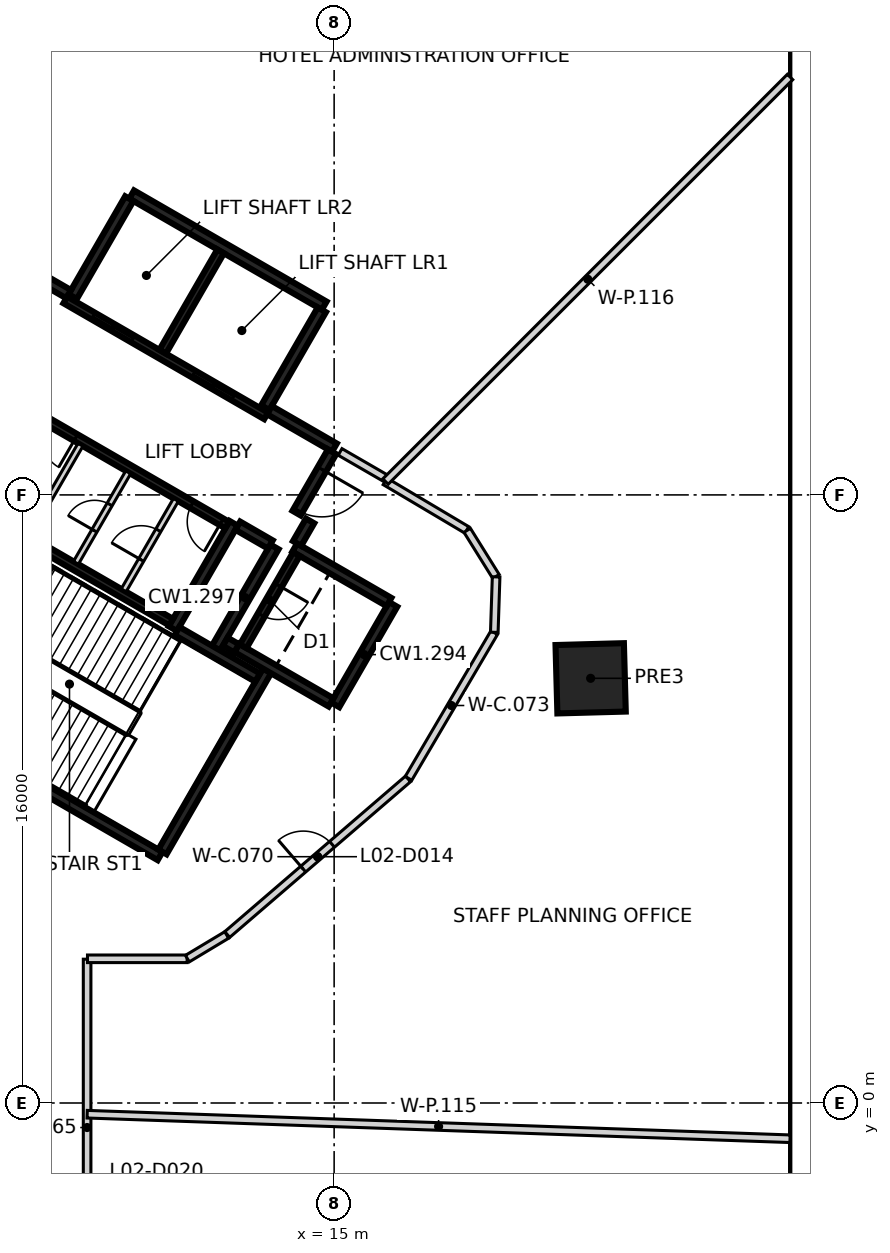
"""IFC4 building model, lengths in metres.
Left out: names, types, materials, properties, quantities, classifications, styles, units other than length and angle.
Written with IfcOpenShell. Run it as: python <this file> out.ifc"""

import sys

from ifc_helpers import new_model, si_unit, direction, frame, frame_2d, origin, origin_2d, place, context, subcontext, project, spatial, rectangle, extrude, element, fill, save


model = new_model("IFC4")
c1 = context("Model", 3, precision=1e-05, world=origin(), true_north=direction((0.0, 1.0)))
c2 = subcontext(c1, "Body", "Model", "MODEL_VIEW")
j1 = project(units=[si_unit("LENGTHUNIT", "METRE"), si_unit("PLANEANGLEUNIT", "RADIAN")], contexts=[c1])
p1 = place(None, origin())
s1 = spatial("IfcSite", under=j1, at=p1, CompositionType="ELEMENT")
p2 = place(p1, origin())
s2 = spatial("IfcBuilding", under=s1, at=p2, CompositionType="ELEMENT")
p3 = place(p2, frame((0.0, 0.0, 14.0)))
s3 = spatial("IfcBuildingStorey", under=s2, at=p3, CompositionType="ELEMENT", Elevation=14.0)
p4 = place(p3, frame((21.749, 11.174, -0.35), z_axis=(0.0, 0.0, 1.0), x_axis=(0.999628128016, 0.02726913418, 0.0)))
e1 = element("IfcColumn", 1, at=p4, inside=s3, PredefinedType="COLUMN", context=c2, shape_type="SweptSolid", body=[
    extrude(rectangle(XDim=1.8, YDim=1.8, at=origin_2d()), origin(), (0.0, 0.0, 1.0), 3.1),
])
p5 = place(p3, frame((10.42, 6.498, 0.0), z_axis=(0.0, 0.0, 1.0), x_axis=(-0.866021906294, 0.500006057782, 0.0)))
e2 = element("IfcWall", 2, at=p5, inside=s3, PredefinedType="SHEAR", context=c2, shape_type="SweptSolid", body=[
    extrude(rectangle(XDim=11.55, YDim=0.25, at=frame_2d((5.775, 0.0))), origin(), (0.0, 0.0, 1.0), 5.15),
])
p6 = place(p5, frame((10.025, 0.0, 0.0)))
e3 = element("IfcOpeningElement", 3, at=p6, cuts=e2, PredefinedType="OPENING", context=c2, shape_type="SweptSolid", body=[
    extrude(rectangle(XDim=1.2, YDim=2.1, at=frame_2d((0.6, 1.05))), frame((0.0, 0.135, 0.0), z_axis=(0.0, -1.0, 0.0), x_axis=(1.0, 0.0, 0.0)), (0.0, 0.0, 1.0), 0.27),
])
p7 = place(p5, frame((8.725, 0.0, 0.0)))
e4 = element("IfcOpeningElement", 4, at=p7, cuts=e2, PredefinedType="OPENING", context=c2, shape_type="SweptSolid", body=[
    extrude(rectangle(XDim=1.2, YDim=2.1, at=frame_2d((0.6, 1.05))), frame((0.0, 0.135, 0.0), z_axis=(0.0, -1.0, 0.0), x_axis=(1.0, 0.0, 0.0)), (0.0, 0.0, 1.0), 0.27),
])
p8 = place(p3, frame((9.673, 23.903, 0.0), z_axis=(0.0, 0.0, 1.0), x_axis=(0.86603616409, -0.499981362141, 0.0)))
e5 = element("IfcWall", 5, at=p8, inside=s3, PredefinedType="SHEAR", context=c2, shape_type="SweptSolid", body=[
    extrude(rectangle(XDim=5.85, YDim=0.25, at=frame_2d((2.925, 0.0))), origin(), (0.0, 0.0, 1.0), 5.15),
])
p9 = place(p3, frame((13.238, 11.378, 0.0), z_axis=(0.0, 0.0, 1.0), x_axis=(-0.500008851346, -0.866020293397, 0.0)))
e6 = element("IfcWall", 6, at=p9, inside=s3, PredefinedType="SHEAR", context=c2, shape_type="SweptSolid", body=[
    extrude(rectangle(XDim=5.51, YDim=0.25, at=frame_2d((2.755, 0.0))), origin(), (0.0, 0.0, 1.0), 5.15),
])
p10 = place(p3, frame((12.357, 15.252, 0.0), z_axis=(0.0, 0.0, 1.0), x_axis=(-0.500028443584, -0.866008981251, 0.0)))
e7 = element("IfcWall", 7, at=p10, inside=s3, PredefinedType="SHEAR", context=c2, shape_type="SweptSolid", body=[
    extrude(rectangle(XDim=3.2, YDim=0.25, at=frame_2d((1.6, 0.0))), origin(), (0.0, 0.0, 1.0), 5.15),
])
for number, where, z_axis, x_axis in (
    (8, (8.123, 21.219, 0.0), (0.0, 0.0, 1.0), (0.5, 0.866, 0.0)),
    (9, (14.676, 20.87, 0.0), (0.0, 0.0, 1.0), (-0.5, -0.866, 0.0)),
):
    element("IfcWall", number, at=place(p3, frame(where, z_axis=z_axis, x_axis=x_axis)), inside=s3, PredefinedType="SHEAR", context=c2, shape_type="SweptSolid", body=[
        extrude(rectangle(XDim=2.975, YDim=0.25, at=frame_2d((1.487, 0.0))), origin(), (0.0, 0.0, 1.0), 5.15),
    ])
p11 = place(p3, frame((16.552, 13.119, 0.0), z_axis=(0.0, 0.0, 1.0), x_axis=(-0.499978833458, -0.866037623948, 0.0)))
e10 = element("IfcWall", 10, at=p11, inside=s3, PredefinedType="SHEAR", context=c2, shape_type="SweptSolid", body=[
    extrude(rectangle(XDim=3.05, YDim=0.25, at=frame_2d((1.525, 0.0))), origin(), (0.0, 0.0, 1.0), 5.15),
])
p12 = place(p3, frame((14.918, 10.54, 0.0), z_axis=(0.0, 0.0, 1.0), x_axis=(-0.866063538972, 0.499933942099, 0.0)))
e11 = element("IfcWall", 11, at=p12, inside=s3, PredefinedType="SHEAR", context=c2, shape_type="SweptSolid", body=[
    extrude(rectangle(XDim=2.865, YDim=0.25, at=frame_2d((1.432, 0.0))), origin(), (0.0, 0.0, 1.0), 5.15),
])
p13 = place(p3, frame((13.963, 14.614, 0.0), z_axis=(0.0, 0.0, 1.0), x_axis=(0.866042235819, -0.499970844928, 0.0)))
e12 = element("IfcWall", 12, at=p13, inside=s3, PredefinedType="SHEAR", context=c2, shape_type="SweptSolid", body=[
    extrude(rectangle(XDim=2.865, YDim=0.25, at=frame_2d((1.432, 0.0))), origin(), (0.0, 0.0, 1.0), 5.15),
])
p14 = place(p3, frame((11.888, 11.961, 0.0), z_axis=(0.0, 0.0, 1.0), x_axis=(0.500003324108, 0.866023484601, 0.0)))
e13 = element("IfcWall", 13, at=p14, inside=s3, PredefinedType="SHEAR", context=c2, shape_type="SweptSolid", body=[
    extrude(rectangle(XDim=3.085, YDim=0.25, at=frame_2d((1.542, 0.0))), origin(), (0.0, 0.0, 1.0), 5.15),
])
p15 = place(p3, frame((10.865, 12.418, 0.0), z_axis=(0.0, 0.0, 1.0), x_axis=(0.866026229868, -0.499998569178, 0.0)))
e14 = element("IfcWall", 14, at=p15, inside=s3, PredefinedType="SHEAR", context=c2, shape_type="SweptSolid", body=[
    extrude(rectangle(XDim=2.449, YDim=0.25, at=frame_2d((1.225, 0.0))), origin(), (0.0, 0.0, 1.0), 5.15),
])
p16 = place(p3, frame((13.297, 18.231, 0.0), z_axis=(0.0, 0.0, 1.0), x_axis=(0.866043531843, -0.499968599967, 0.0)))
e15 = element("IfcWall", 15, at=p16, inside=s3, PredefinedType="SHEAR", context=c2, shape_type="SweptSolid", body=[
    extrude(rectangle(XDim=1.975, YDim=0.25, at=frame_2d((0.987, 0.0))), origin(), (0.0, 0.0, 1.0), 5.15),
])
p17 = place(p3, frame((6.413, 22.206, 0.0), z_axis=(0.0, 0.0, 1.0), x_axis=(0.866016279763, -0.500015802937, 0.0)))
e16 = element("IfcWall", 16, at=p17, inside=s3, PredefinedType="SHEAR", context=c2, shape_type="SweptSolid", body=[
    extrude(rectangle(XDim=1.849, YDim=0.25, at=frame_2d((0.925, 0.0))), origin(), (0.0, 0.0, 1.0), 5.15),
])
p18 = place(p3, frame((14.945, 17.135, 0.0), z_axis=(0.0, 0.0, 1.0), x_axis=(-0.499983108224, -0.866035156036, 0.0)))
e17 = element("IfcWall", 17, at=p18, inside=s3, PredefinedType="SHEAR", context=c2, shape_type="SweptSolid", body=[
    extrude(rectangle(XDim=1.865, YDim=0.25, at=frame_2d((0.932, 0.0))), origin(), (0.0, 0.0, 1.0), 5.15),
])
p19 = place(p18, frame((0.535, 0.0, 0.0)))
e18 = element("IfcOpeningElement", 18, at=p19, cuts=e17, PredefinedType="OPENING", context=c2, shape_type="SweptSolid", body=[
    extrude(rectangle(XDim=1.25, YDim=2.1, at=frame_2d((0.625, 1.05))), frame((0.0, 0.135, 0.0), z_axis=(0.0, -1.0, 0.0), x_axis=(1.0, 0.0, 0.0)), (0.0, 0.0, 1.0), 0.27),
])
p20 = place(p3, frame((13.322, 14.695, 0.0), z_axis=(0.0, 0.0, 1.0), x_axis=(-0.866017078145, 0.500014420154, 0.0)))
e19 = element("IfcWall", 19, at=p20, inside=s3, PredefinedType="SHEAR", context=c2, shape_type="SweptSolid", body=[
    extrude(rectangle(XDim=0.989, YDim=0.25, at=frame_2d((0.495, 0.0))), origin(), (0.0, 0.0, 1.0), 5.15),
])
p21 = place(p3, frame((14.368, 15.315, 0.0), z_axis=(0.0, 0.0, 1.0), x_axis=(-0.499897359611, -0.866084655132, 0.0)))
e20 = element("IfcWall", 20, at=p21, inside=s3, PredefinedType="SHEAR", context=c2, shape_type="SweptSolid", body=[
    extrude(rectangle(XDim=0.685, YDim=0.25, at=frame_2d((0.342, 0.0))), origin(), (0.0, 0.0, 1.0), 5.15),
])
p22 = place(p3, frame((12.433, 11.964, 0.0), z_axis=(0.0, 0.0, 1.0), x_axis=(-0.866055875208, 0.499947218231, 0.0)))
e21 = element("IfcWall", 21, at=p22, inside=s3, PredefinedType="SHEAR", context=c2, shape_type="SweptSolid", body=[
    extrude(rectangle(XDim=0.345, YDim=0.25, at=frame_2d((0.172, 0.0))), origin(), (0.0, 0.0, 1.0), 5.15),
])
p23 = place(p3, frame((13.21, 18.08, 0.0), z_axis=(0.0, 0.0, 1.0), x_axis=(-0.866030299012, 0.499991521122, 0.0)))
e22 = element("IfcWall", 22, at=p23, inside=s3, PredefinedType="SHEAR", context=c2, shape_type="SweptSolid", body=[
    extrude(rectangle(XDim=6.1, YDim=0.2, at=frame_2d((3.05, 0.0))), origin(), (0.0, 0.0, 1.0), 5.15),
])
p24 = place(p23, frame((1.0, 0.0, 0.0)))
e23 = element("IfcOpeningElement", 23, at=p24, cuts=e22, PredefinedType="OPENING", context=c2, shape_type="SweptSolid", body=[
    extrude(rectangle(XDim=1.2, YDim=2.1, at=frame_2d((0.6, 1.05))), frame((0.0, 0.11, 0.0), z_axis=(0.0, -1.0, 0.0), x_axis=(1.0, 0.0, 0.0)), (0.0, 0.0, 1.0), 0.22),
])
p25 = place(p23, frame((4.05, 0.0, 0.0)))
e24 = element("IfcOpeningElement", 24, at=p25, cuts=e22, PredefinedType="OPENING", context=c2, shape_type="SweptSolid", body=[
    extrude(rectangle(XDim=1.2, YDim=2.1, at=frame_2d((0.6, 1.05))), frame((0.0, 0.11, 0.0), z_axis=(0.0, -1.0, 0.0), x_axis=(1.0, 0.0, 0.0)), (0.0, 0.0, 1.0), 0.22),
])
p26 = place(p3, frame((5.775, 15.502, 0.0), z_axis=(0.0, 0.0, 1.0), x_axis=(0.866020080793, -0.500009219579, 0.0)))
e25 = element("IfcWall", 25, at=p26, inside=s3, PredefinedType="SHEAR", context=c2, shape_type="SweptSolid", body=[
    extrude(rectangle(XDim=5.699, YDim=0.2, at=frame_2d((2.85, 0.0))), origin(), (0.0, 0.0, 1.0), 5.15),
])
p27 = place(p3, frame((12.185, 15.207, 0.0), z_axis=(0.0, 0.0, 1.0), x_axis=(-0.866020080793, 0.500009219579, 0.0)))
e26 = element("IfcWall", 26, at=p27, inside=s3, PredefinedType="SHEAR", context=c2, shape_type="SweptSolid", body=[
    extrude(rectangle(XDim=5.699, YDim=0.2, at=frame_2d((2.85, 0.0))), origin(), (0.0, 0.0, 1.0), 5.15),
])
p28 = place(p27, frame((0.174, 0.0, 0.0)))
e27 = element("IfcOpeningElement", 27, at=p28, cuts=e26, PredefinedType="OPENING", context=c2, shape_type="SweptSolid", body=[
    extrude(rectangle(XDim=0.9, YDim=2.1, at=frame_2d((0.45, 1.05))), frame((0.0, 0.11, 0.0), z_axis=(0.0, -1.0, 0.0), x_axis=(1.0, 0.0, 0.0)), (0.0, 0.0, 1.0), 0.22),
])
p29 = place(p27, frame((4.599, 0.0, 0.0)))
e28 = element("IfcOpeningElement", 28, at=p29, cuts=e26, PredefinedType="OPENING", context=c2, shape_type="SweptSolid", body=[
    extrude(rectangle(XDim=0.9, YDim=2.1, at=frame_2d((0.45, 1.05))), frame((0.0, 0.11, 0.0), z_axis=(0.0, -1.0, 0.0), x_axis=(1.0, 0.0, 0.0)), (0.0, 0.0, 1.0), 0.22),
])
p30 = place(p3, frame((10.489, 19.767, 0.0), z_axis=(0.0, 0.0, 1.0), x_axis=(0.499946628782, 0.866056215479, 0.0)))
e29 = element("IfcWall", 29, at=p30, inside=s3, PredefinedType="SHEAR", context=c2, shape_type="SweptSolid", body=[
    extrude(rectangle(XDim=3.048, YDim=0.2, at=frame_2d((1.524, 0.0))), origin(), (0.0, 0.0, 1.0), 5.15),
])
p31 = place(p3, frame((14.008, 14.442, 0.0), z_axis=(0.0, 0.0, 1.0), x_axis=(-0.499986818241, -0.866033014143, 0.0)))
e30 = element("IfcWall", 30, at=p31, inside=s3, PredefinedType="SHEAR", context=c2, shape_type="SweptSolid", body=[
    extrude(rectangle(XDim=2.798, YDim=0.2, at=frame_2d((1.399, 0.0))), origin(), (0.0, 0.0, 1.0), 5.15),
])
p32 = place(p31, frame((0.949, 0.0, 0.0)))
e31 = element("IfcOpeningElement", 31, at=p32, cuts=e30, PredefinedType="OPENING", context=c2, shape_type="SweptSolid", body=[
    extrude(rectangle(XDim=0.9, YDim=2.1, at=frame_2d((0.45, 1.05))), frame((0.0, 0.11, 0.0), z_axis=(0.0, -1.0, 0.0), x_axis=(1.0, 0.0, 0.0)), (0.0, 0.0, 1.0), 0.22),
])
p33 = place(p3, frame((9.462, 13.489, 0.0), z_axis=(0.0, 0.0, 1.0), x_axis=(0.50002746344, 0.86600954718, 0.0)))
e32 = element("IfcWall", 32, at=p33, inside=s3, PredefinedType="PARTITIONING", context=c2, shape_type="SweptSolid", body=[
    extrude(rectangle(XDim=2.748, YDim=0.15, at=frame_2d((1.374, 0.0))), origin(), (0.0, 0.0, 1.0), 5.15),
])
p34 = place(p33, frame((0.924, 0.0, 0.0)))
e33 = element("IfcOpeningElement", 33, at=p34, cuts=e32, PredefinedType="OPENING", context=c2, shape_type="SweptSolid", body=[
    extrude(rectangle(XDim=0.9, YDim=2.1, at=frame_2d((0.45, 1.05))), frame((0.0, 0.085, 0.0), z_axis=(0.0, -1.0, 0.0), x_axis=(1.0, 0.0, 0.0)), (0.0, 0.0, 1.0), 0.17),
])
p35 = place(p3, frame((8.207, 14.214, 0.0), z_axis=(0.0, 0.0, 1.0), x_axis=(0.499922376475, 0.866070215109, 0.0)))
e34 = element("IfcWall", 34, at=p35, inside=s3, PredefinedType="PARTITIONING", context=c2, shape_type="SweptSolid", body=[
    extrude(rectangle(XDim=2.749, YDim=0.15, at=frame_2d((1.374, 0.0))), origin(), (0.0, 0.0, 1.0), 5.15),
])
p36 = place(p35, frame((0.974, 0.0, 0.0)))
e35 = element("IfcOpeningElement", 35, at=p36, cuts=e34, PredefinedType="OPENING", context=c2, shape_type="SweptSolid", body=[
    extrude(rectangle(XDim=0.8, YDim=2.1, at=frame_2d((0.4, 1.05))), frame((0.0, 0.085, 0.0), z_axis=(0.0, -1.0, 0.0), x_axis=(1.0, 0.0, 0.0)), (0.0, 0.0, 1.0), 0.17),
])
p37 = place(p3, frame((6.951, 14.939, 0.0), z_axis=(0.0, 0.0, 1.0), x_axis=(0.50002746344, 0.86600954718, 0.0)))
e36 = element("IfcWall", 36, at=p37, inside=s3, PredefinedType="PARTITIONING", context=c2, shape_type="SweptSolid", body=[
    extrude(rectangle(XDim=2.748, YDim=0.15, at=frame_2d((1.374, 0.0))), origin(), (0.0, 0.0, 1.0), 5.15),
])
p38 = place(p3, frame((8.5, -5.075, 0.0), z_axis=(0.0, 0.0, 1.0), x_axis=(0.0, 1.0, 0.0)))
e37 = element("IfcWall", 37, at=p38, inside=s3, PredefinedType="PARTITIONING", context=c2, shape_type="SweptSolid", body=[
    extrude(rectangle(XDim=8.859, YDim=0.2, at=frame_2d((4.429, 0.0))), origin(), (0.0, 0.0, 1.0), 5.15),
])
p39 = place(p38, frame((1.945, 0.0, 0.0)))
e38 = element("IfcOpeningElement", 38, at=p39, cuts=e37, PredefinedType="OPENING", context=c2, shape_type="SweptSolid", body=[
    extrude(rectangle(XDim=0.9, YDim=2.1, at=frame_2d((0.45, 1.05))), frame((0.0, 0.11, 0.0), z_axis=(0.0, -1.0, 0.0), x_axis=(1.0, 0.0, 0.0)), (0.0, 0.0, 1.0), 0.22),
])
p40 = place(p3, frame((8.51, 3.794, 0.0), z_axis=(0.0, 0.0, 1.0), x_axis=(1.0, 0.0, 0.0)))
e39 = element("IfcWall", 39, at=p40, inside=s3, PredefinedType="PARTITIONING", context=c2, shape_type="SweptSolid", body=[
    extrude(rectangle(XDim=2.622, YDim=0.2, at=frame_2d((1.311, 0.0))), origin(), (0.0, 0.0, 1.0), 5.15),
])
p41 = place(p3, frame((11.138, 3.799, 0.0), z_axis=(0.0, 0.0, 1.0), x_axis=(0.857225224173, 0.514941661785, 0.0)))
e40 = element("IfcWall", 40, at=p41, inside=s3, PredefinedType="PARTITIONING", context=c2, shape_type="SweptSolid", body=[
    extrude(rectangle(XDim=1.208, YDim=0.2, at=frame_2d((0.604, 0.0))), origin(), (0.0, 0.0, 1.0), 5.15),
])
p42 = place(p3, frame((12.187, 4.433, 0.0), z_axis=(0.0, 0.0, 1.0), x_axis=(0.757945584444, 0.652317783769, 0.0)))
e41 = element("IfcWall", 41, at=p42, inside=s3, PredefinedType="PARTITIONING", context=c2, shape_type="SweptSolid", body=[
    extrude(rectangle(XDim=6.278, YDim=0.2, at=frame_2d((3.139, 0.0))), origin(), (0.0, 0.0, 1.0), 5.15),
])
p43 = place(p42, frame((2.639, 0.0, 0.0)))
e42 = element("IfcOpeningElement", 42, at=p43, cuts=e41, PredefinedType="OPENING", context=c2, shape_type="SweptSolid", body=[
    extrude(rectangle(XDim=1.0, YDim=2.1, at=frame_2d((0.5, 1.05))), frame((0.0, 0.11, 0.0), z_axis=(0.0, -1.0, 0.0), x_axis=(1.0, 0.0, 0.0)), (0.0, 0.0, 1.0), 0.22),
])
p44 = place(p3, frame((15.156, 17.131, 0.0), z_axis=(0.0, 0.0, 1.0), x_axis=(0.865567897455, -0.500791588284, 0.0)))
e43 = element("IfcWall", 43, at=p44, inside=s3, PredefinedType="PARTITIONING", context=c2, shape_type="SweptSolid", body=[
    extrude(rectangle(XDim=1.377, YDim=0.2, at=frame_2d((0.688, 0.0))), origin(), (0.0, 0.0, 1.0), 5.15),
])
p45 = place(p3, frame((16.341, 16.356, 0.0), z_axis=(0.0, 0.0, 1.0), x_axis=(0.859680670174, -0.510831817067, 0.0)))
e44 = element("IfcWall", 44, at=p45, inside=s3, PredefinedType="PARTITIONING", context=c2, shape_type="SweptSolid", body=[
    extrude(rectangle(XDim=2.502, YDim=0.2, at=frame_2d((1.251, 0.0))), origin(), (0.0, 0.0, 1.0), 5.15),
])
p46 = place(p3, frame((16.957, 8.542, 0.0), z_axis=(0.0, 0.0, 1.0), x_axis=(0.506952960322, 0.861973721189, 0.0)))
e45 = element("IfcWall", 45, at=p46, inside=s3, PredefinedType="PARTITIONING", context=c2, shape_type="SweptSolid", body=[
    extrude(rectangle(XDim=4.448, YDim=0.2, at=frame_2d((2.224, 0.0))), origin(), (0.0, 0.0, 1.0), 5.15),
])
p47 = place(p3, frame((18.501, 15.068, 0.0), z_axis=(0.0, 0.0, 1.0), x_axis=(0.529124417946, -0.84854425361, 0.0)))
e46 = element("IfcWall", 46, at=p47, inside=s3, PredefinedType="PARTITIONING", context=c2, shape_type="SweptSolid", body=[
    extrude(rectangle(XDim=1.431, YDim=0.2, at=frame_2d((0.715, 0.0))), origin(), (0.0, 0.0, 1.0), 5.15),
])
p48 = place(p3, frame((19.214, 12.385, 0.0), z_axis=(0.0, 0.0, 1.0), x_axis=(0.032802164331, 0.999461864213, 0.0)))
e47 = element("IfcWall", 47, at=p48, inside=s3, PredefinedType="PARTITIONING", context=c2, shape_type="SweptSolid", body=[
    extrude(rectangle(XDim=1.459, YDim=0.2, at=frame_2d((0.729, 0.0))), origin(), (0.0, 0.0, 1.0), 5.15),
])
p49 = place(p3, frame((8.502, -0.295, 0.0), z_axis=(0.0, 0.0, 1.0), x_axis=(0.999391369185, -0.034883967631, 0.0)))
e48 = element("IfcWall", 48, at=p49, inside=s3, PredefinedType="PARTITIONING", context=c2, shape_type="SweptSolid", body=[
    extrude(rectangle(XDim=18.504, YDim=0.2, at=frame_2d((9.252, 0.0))), origin(), (0.0, 0.0, 1.0), 2.75),
])
p50 = place(p3, frame((16.352, 16.352, 0.0), z_axis=(0.0, 0.0, 1.0), x_axis=(0.707106781187, 0.707106781187, 0.0)))
e49 = element("IfcWall", 49, at=p50, inside=s3, PredefinedType="PARTITIONING", context=c2, shape_type="SweptSolid", body=[
    extrude(rectangle(XDim=15.054, YDim=0.2, at=frame_2d((7.527, 0.0))), origin(), (0.0, 0.0, 1.0), 2.75),
])
p51 = place(p24, origin())
e50 = element("IfcDoor", 50, at=p51, inside=s3, OperationType="DOUBLE_DOOR_SLIDING", PredefinedType="DOOR", context=c2, shape_type="SweptSolid", body=[
    extrude(rectangle(XDim=1.2, YDim=2.1, at=frame_2d((0.6, 1.05))), frame((0.0, 0.025, 0.0), z_axis=(0.0, -1.0, 0.0), x_axis=(1.0, 0.0, 0.0)), (0.0, 0.0, 1.0), 0.05),
])
fill(e23, e50)
p52 = place(p25, origin())
e51 = element("IfcDoor", 51, at=p52, inside=s3, OperationType="DOUBLE_DOOR_SLIDING", PredefinedType="DOOR", context=c2, shape_type="SweptSolid", body=[
    extrude(rectangle(XDim=1.2, YDim=2.1, at=frame_2d((0.6, 1.05))), frame((0.0, 0.025, 0.0), z_axis=(0.0, -1.0, 0.0), x_axis=(1.0, 0.0, 0.0)), (0.0, 0.0, 1.0), 0.05),
])
fill(e24, e51)
p53 = place(p19, origin())
e52 = element("IfcDoor", 52, at=p53, inside=s3, OperationType="SINGLE_SWING_LEFT", PredefinedType="DOOR", context=c2, shape_type="SweptSolid", body=[
    extrude(rectangle(XDim=1.25, YDim=2.1, at=frame_2d((0.625, 1.05))), frame((0.0, 0.025, 0.0), z_axis=(0.0, -1.0, 0.0), x_axis=(1.0, 0.0, 0.0)), (0.0, 0.0, 1.0), 0.05),
])
fill(e18, e52)
p54 = place(p28, origin())
e53 = element("IfcDoor", 53, at=p54, inside=s3, OperationType="SINGLE_SWING_RIGHT", PredefinedType="DOOR", context=c2, shape_type="SweptSolid", body=[
    extrude(rectangle(XDim=0.9, YDim=2.1, at=frame_2d((0.45, 1.05))), frame((0.0, 0.025, 0.0), z_axis=(0.0, -1.0, 0.0), x_axis=(1.0, 0.0, 0.0)), (0.0, 0.0, 1.0), 0.05),
])
fill(e27, e53)
p55 = place(p34, origin())
e54 = element("IfcDoor", 54, at=p55, inside=s3, OperationType="SINGLE_SWING_LEFT", PredefinedType="DOOR", context=c2, shape_type="SweptSolid", body=[
    extrude(rectangle(XDim=0.9, YDim=2.1, at=frame_2d((0.45, 1.05))), frame((0.0, 0.025, 0.0), z_axis=(0.0, -1.0, 0.0), x_axis=(1.0, 0.0, 0.0)), (0.0, 0.0, 1.0), 0.05),
])
fill(e33, e54)
p56 = place(p36, origin())
e55 = element("IfcDoor", 55, at=p56, inside=s3, OperationType="SINGLE_SWING_RIGHT", PredefinedType="DOOR", context=c2, shape_type="SweptSolid", body=[
    extrude(rectangle(XDim=0.8, YDim=2.1, at=frame_2d((0.4, 1.05))), frame((0.0, 0.025, 0.0), z_axis=(0.0, -1.0, 0.0), x_axis=(1.0, 0.0, 0.0)), (0.0, 0.0, 1.0), 0.05),
])
fill(e35, e55)
p57 = place(p29, origin())
e56 = element("IfcDoor", 56, at=p57, inside=s3, OperationType="SINGLE_SWING_LEFT", PredefinedType="DOOR", context=c2, shape_type="SweptSolid", body=[
    extrude(rectangle(XDim=0.9, YDim=2.1, at=frame_2d((0.45, 1.05))), frame((0.0, 0.025, 0.0), z_axis=(0.0, -1.0, 0.0), x_axis=(1.0, 0.0, 0.0)), (0.0, 0.0, 1.0), 0.05),
])
fill(e28, e56)
p58 = place(p32, origin())
e57 = element("IfcDoor", 57, at=p58, inside=s3, OperationType="SINGLE_SWING_RIGHT", PredefinedType="DOOR", context=c2, shape_type="SweptSolid", body=[
    extrude(rectangle(XDim=0.9, YDim=2.1, at=frame_2d((0.45, 1.05))), frame((0.0, 0.025, 0.0), z_axis=(0.0, -1.0, 0.0), x_axis=(1.0, 0.0, 0.0)), (0.0, 0.0, 1.0), 0.05),
])
fill(e31, e57)
p59 = place(p43, frame((1.0, 0.0, 0.0), z_axis=(0.0, 0.0, 1.0), x_axis=(-1.0, 0.0, 0.0)))
e58 = element("IfcDoor", 58, at=p59, inside=s3, OperationType="SINGLE_SWING_LEFT", PredefinedType="DOOR", context=c2, shape_type="SweptSolid", body=[
    extrude(rectangle(XDim=1.0, YDim=2.1, at=frame_2d((0.5, 1.05))), frame((0.0, 0.025, 0.0), z_axis=(0.0, -1.0, 0.0), x_axis=(1.0, 0.0, 0.0)), (0.0, 0.0, 1.0), 0.05),
])
fill(e42, e58)
save(model, sys.argv[1])
